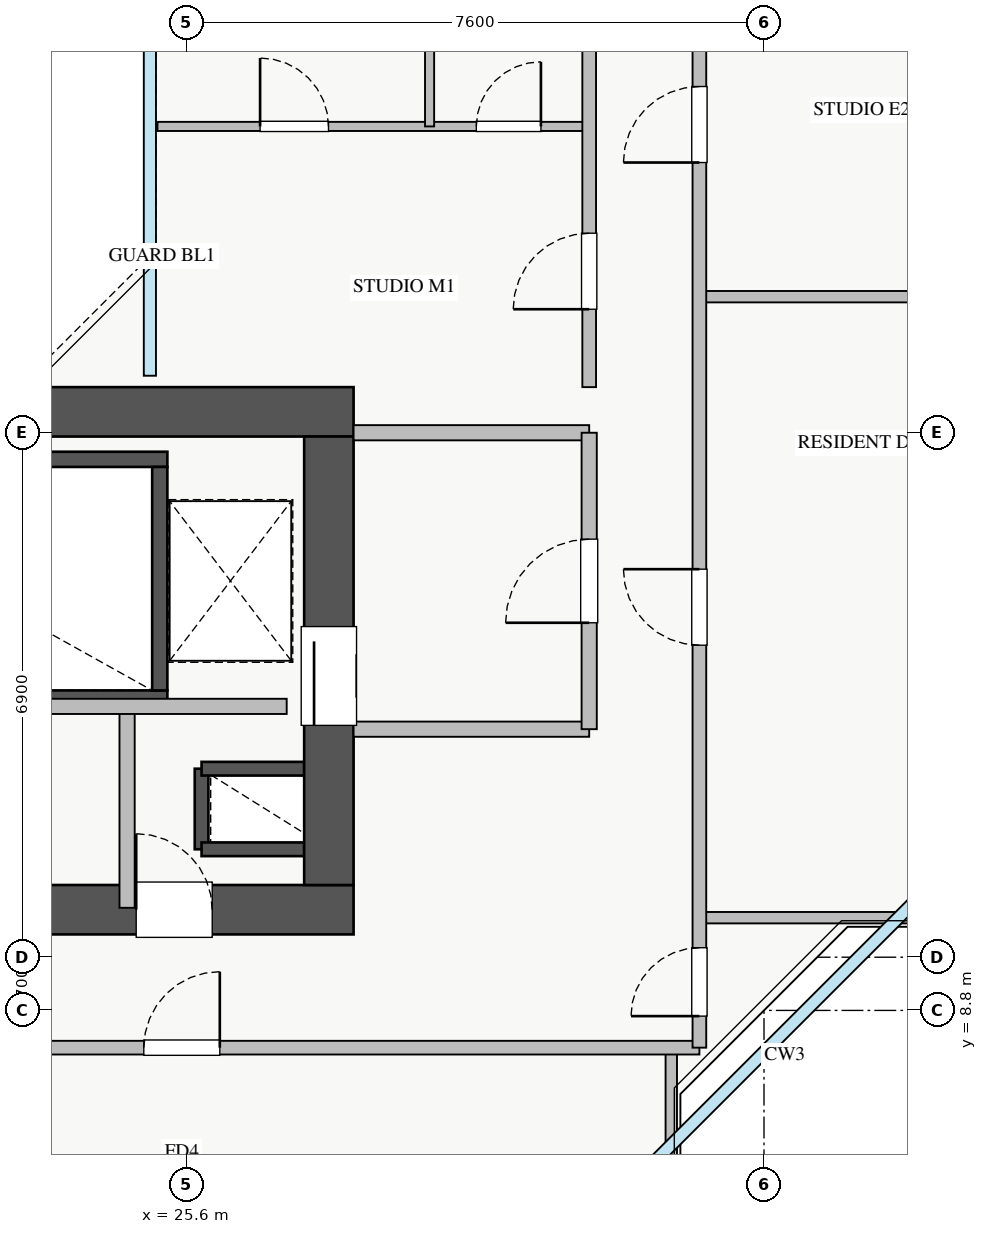
"""IFC4 building model, lengths in metres.
Left out: names, types, materials, properties, quantities, classifications, styles, units other than length and angle.
Written with IfcOpenShell. Run it as: python <this file> out.ifc"""

import sys

from ifc_helpers import new_model, si_unit, direction, frame, frame_2d, origin, place, context, subcontext, project, spatial, rectangle, extrude, source, transform, mapped, element, fill, save


model = new_model("IFC4")
c1 = context("Model", 3, precision=1e-05, world=origin(), true_north=direction((0.0, 1.0)))
c2 = subcontext(c1, "Body", "Model", "MODEL_VIEW")
j1 = project(units=[si_unit("LENGTHUNIT", "METRE"), si_unit("PLANEANGLEUNIT", "RADIAN")], contexts=[c1])
p1 = place(None, origin())
s1 = spatial("IfcSite", under=j1, at=p1, CompositionType="ELEMENT")
p2 = place(p1, origin())
s2 = spatial("IfcBuilding", under=s1, at=p2, CompositionType="ELEMENT")
p3 = place(p2, frame((0.0, 0.0, 126.25)))
s3 = spatial("IfcBuildingStorey", under=s2, at=p3, CompositionType="ELEMENT", Elevation=126.25)
p4 = place(p3, frame((25.8, 10.92, 0.0), z_axis=(0.0, 0.0, 1.0), x_axis=(0.0, 1.0, 0.0)))
e1 = element("IfcWall", 1, at=p4, inside=s3, PredefinedType="SHEAR", context=c2, shape_type="SweptSolid", body=[
    extrude(rectangle(XDim=1.06, YDim=0.18, at=frame_2d((0.53, 0.0))), origin(), (0.0, 0.0, 1.0), 3.07),
])
for number, where, z_axis, x_axis in (
    (2, (25.8, 11.98, 0.0), (0.0, 0.0, 1.0), (1.0, 0.0, 0.0)),
    (3, (25.8, 10.92, 0.0), (0.0, 0.0, 1.0), (1.0, 0.0, 0.0)),
):
    element("IfcWall", number, at=place(p3, frame(where, z_axis=z_axis, x_axis=x_axis)), inside=s3, PredefinedType="SHEAR", context=c2, shape_type="SweptSolid", body=[
        extrude(rectangle(XDim=1.35, YDim=0.18, at=frame_2d((0.675, 0.0))), origin(), (0.0, 0.0, 1.0), 3.07),
    ])
p5 = place(p3, frame((18.2, 12.91, 0.0), z_axis=(0.0, 0.0, 1.0), x_axis=(1.0, 0.0, 0.0)))
e4 = element("IfcWall", 4, at=p5, inside=s3, PredefinedType="SHEAR", context=c2, shape_type="SweptSolid", body=[
    extrude(rectangle(XDim=7.15, YDim=0.2, at=frame_2d((3.575, 0.0))), origin(), (0.0, 0.0, 1.0), 3.25),
])
p6 = place(p5, frame((0.35, 0.0, 0.0)))
e5 = element("IfcOpeningElement", 5, at=p6, cuts=e4, PredefinedType="OPENING", context=c2, shape_type="SweptSolid", body=[
    extrude(rectangle(XDim=1.1, YDim=2.05, at=frame_2d((0.55, 1.025))), frame((0.0, 0.11, 0.0), z_axis=(0.0, -1.0, 0.0), x_axis=(1.0, 0.0, 0.0)), (0.0, 0.0, 1.0), 0.22),
])
p7 = place(p3, frame((18.2, 16.05, 0.0), z_axis=(0.0, 0.0, 1.0), x_axis=(1.0, 0.0, 0.0)))
e6 = element("IfcWall", 6, at=p7, inside=s3, PredefinedType="SHEAR", context=c2, shape_type="SweptSolid", body=[
    extrude(rectangle(XDim=7.15, YDim=0.2, at=frame_2d((3.575, 0.0))), origin(), (0.0, 0.0, 1.0), 3.25),
])
p8 = place(p3, frame((25.25, 13.01, 0.0), z_axis=(0.0, 0.0, 1.0), x_axis=(0.0, 1.0, 0.0)))
e7 = element("IfcWall", 7, at=p8, inside=s3, PredefinedType="SHEAR", context=c2, shape_type="SweptSolid", body=[
    extrude(rectangle(XDim=2.94, YDim=0.2, at=frame_2d((1.47, 0.0))), origin(), (0.0, 0.0, 1.0), 3.25),
])
p9 = place(p3, frame((10.2, 10.125, 0.0), z_axis=(0.0, 0.0, 1.0), x_axis=(1.0, 0.0, 0.0)))
e8 = element("IfcWall", 8, at=p9, inside=s3, PredefinedType="SHEAR", context=c2, shape_type="SweptSolid", body=[
    extrude(rectangle(XDim=17.6, YDim=0.65, at=frame_2d((8.8, 0.0))), origin(), (0.0, 0.0, 1.0), 3.25),
])
p10 = place(p9, frame((1.15, 0.0, 0.0)))
e9 = element("IfcOpeningElement", 9, at=p10, cuts=e8, PredefinedType="OPENING", context=c2, shape_type="SweptSolid", body=[
    extrude(rectangle(XDim=1.1, YDim=2.05, at=frame_2d((0.55, 1.025))), frame((0.0, 0.335, 0.0), z_axis=(0.0, -1.0, 0.0), x_axis=(1.0, 0.0, 0.0)), (0.0, 0.0, 1.0), 0.67),
])
p11 = place(p9, frame((8.3, 0.0, 0.0)))
e10 = element("IfcOpeningElement", 10, at=p11, cuts=e8, PredefinedType="OPENING", context=c2, shape_type="SweptSolid", body=[
    extrude(rectangle(XDim=1.1, YDim=2.05, at=frame_2d((0.55, 1.025))), frame((0.0, 0.335, 0.0), z_axis=(0.0, -1.0, 0.0), x_axis=(1.0, 0.0, 0.0)), (0.0, 0.0, 1.0), 0.67),
])
p12 = place(p9, frame((4.9, 0.0, 0.0)))
e11 = element("IfcOpeningElement", 11, at=p12, cuts=e8, PredefinedType="OPENING", context=c2, shape_type="SweptSolid", body=[
    extrude(rectangle(XDim=1.1, YDim=2.05, at=frame_2d((0.55, 1.025))), frame((0.0, 0.335, 0.0), z_axis=(0.0, -1.0, 0.0), x_axis=(1.0, 0.0, 0.0)), (0.0, 0.0, 1.0), 0.67),
])
p13 = place(p9, frame((14.74, 0.0, 0.0)))
e12 = element("IfcOpeningElement", 12, at=p13, cuts=e8, PredefinedType="OPENING", context=c2, shape_type="SweptSolid", body=[
    extrude(rectangle(XDim=1.0, YDim=2.05, at=frame_2d((0.5, 1.025))), frame((0.0, 0.335, 0.0), z_axis=(0.0, -1.0, 0.0), x_axis=(1.0, 0.0, 0.0)), (0.0, 0.0, 1.0), 0.67),
])
p14 = place(p9, frame((11.67, 0.0, 0.0)))
e13 = element("IfcOpeningElement", 13, at=p14, cuts=e8, PredefinedType="OPENING", context=c2, shape_type="SweptSolid", body=[
    extrude(rectangle(XDim=1.0, YDim=2.05, at=frame_2d((0.5, 1.025))), frame((0.0, 0.335, 0.0), z_axis=(0.0, -1.0, 0.0), x_axis=(1.0, 0.0, 0.0)), (0.0, 0.0, 1.0), 0.67),
])
p15 = place(p3, frame((10.2, 16.675, 0.0), z_axis=(0.0, 0.0, 1.0), x_axis=(1.0, 0.0, 0.0)))
e14 = element("IfcWall", 14, at=p15, inside=s3, PredefinedType="SHEAR", context=c2, shape_type="SweptSolid", body=[
    extrude(rectangle(XDim=17.6, YDim=0.65, at=frame_2d((8.8, 0.0))), origin(), (0.0, 0.0, 1.0), 3.25),
])
p16 = place(p3, frame((27.475, 10.45, 0.0), z_axis=(0.0, 0.0, 1.0), x_axis=(0.0, 1.0, 0.0)))
e15 = element("IfcWall", 15, at=p16, inside=s3, PredefinedType="SHEAR", context=c2, shape_type="SweptSolid", body=[
    extrude(rectangle(XDim=5.9, YDim=0.65, at=frame_2d((2.95, 0.0))), origin(), (0.0, 0.0, 1.0), 3.25),
])
p17 = place(p16, frame((2.1, 0.0, 0.0)))
e16 = element("IfcOpeningElement", 16, at=p17, cuts=e15, PredefinedType="OPENING", context=c2, shape_type="SweptSolid", body=[
    extrude(rectangle(XDim=1.3, YDim=2.05, at=frame_2d((0.65, 1.025))), frame((0.0, 0.335, 0.0), z_axis=(0.0, -1.0, 0.0), x_axis=(1.0, 0.0, 0.0)), (0.0, 0.0, 1.0), 0.67),
])
for number, where, z_axis, x_axis in (
    (17, (27.8, 16.4, 0.0), (0.0, 0.0, 1.0), (1.0, 0.0, 0.0)),
    (18, (27.8, 12.5, 0.0), (0.0, 0.0, 1.0), (1.0, 0.0, 0.0)),
):
    element("IfcWall", number, at=place(p3, frame(where, z_axis=z_axis, x_axis=x_axis)), inside=s3, PredefinedType="PARTITIONING", context=c2, shape_type="SweptSolid", body=[
        extrude(rectangle(XDim=3.1, YDim=0.2, at=frame_2d((1.55, 0.0))), origin(), (0.0, 0.0, 1.0), 3.07),
    ])
p18 = place(p3, frame((30.9, 12.5, 0.0), z_axis=(0.0, 0.0, 1.0), x_axis=(0.0, 1.0, 0.0)))
e19 = element("IfcWall", 19, at=p18, inside=s3, PredefinedType="PARTITIONING", context=c2, shape_type="SweptSolid", body=[
    extrude(rectangle(XDim=3.9, YDim=0.2, at=frame_2d((1.95, 0.0))), origin(), (0.0, 0.0, 1.0), 3.07),
])
p19 = place(p18, frame((1.4, 0.0, 0.0)))
e20 = element("IfcOpeningElement", 20, at=p19, cuts=e19, PredefinedType="OPENING", context=c2, shape_type="SweptSolid", body=[
    extrude(rectangle(XDim=1.1, YDim=2.05, at=frame_2d((0.55, 1.025))), frame((0.0, 0.11, 0.0), z_axis=(0.0, -1.0, 0.0), x_axis=(1.0, 0.0, 0.0)), (0.0, 0.0, 1.0), 0.22),
])
p20 = place(p3, frame((24.82, 10.15, 0.0), z_axis=(0.0, 0.0, 1.0), x_axis=(0.0, 1.0, 0.0)))
e21 = element("IfcWall", 21, at=p20, inside=s3, PredefinedType="PARTITIONING", context=c2, shape_type="SweptSolid", body=[
    extrude(rectangle(XDim=2.65, YDim=0.2, at=frame_2d((1.325, 0.0))), origin(), (0.0, 0.0, 1.0), 3.07),
])
p21 = place(p3, frame((21.75, 12.8, 0.0), z_axis=(0.0, 0.0, 1.0), x_axis=(1.0, 0.0, 0.0)))
e22 = element("IfcWall", 22, at=p21, inside=s3, PredefinedType="PARTITIONING", context=c2, shape_type="SweptSolid", body=[
    extrude(rectangle(XDim=5.17, YDim=0.2, at=frame_2d((2.585, 0.0))), origin(), (0.0, 0.0, 1.0), 3.07),
])
p22 = place(p3, frame((31.98, 5.35, 0.0), z_axis=(0.0, 0.0, 1.0), x_axis=(0.0, 1.0, 0.0)))
e23 = element("IfcWall", 23, at=p22, inside=s3, PredefinedType="PARTITIONING", context=c2, shape_type="SweptSolid", body=[
    extrude(rectangle(XDim=2.96, YDim=0.15, at=frame_2d((1.48, 0.0))), origin(), (0.0, 0.0, 1.0), 3.07),
])
p23 = place(p3, frame((8.72, 8.31, 0.0), z_axis=(0.0, 0.0, 1.0), x_axis=(1.0, 0.0, 0.0)))
e24 = element("IfcWall", 24, at=p23, inside=s3, PredefinedType="PARTITIONING", context=c2, shape_type="SweptSolid", body=[
    extrude(rectangle(XDim=23.63, YDim=0.18, at=frame_2d((11.815, 0.0))), origin(), (0.0, 0.0, 1.0), 3.07),
])
p24 = place(p23, frame((4.69, 0.0, 0.0)))
e25 = element("IfcOpeningElement", 25, at=p24, cuts=e24, PredefinedType="OPENING", context=c2, shape_type="SweptSolid", body=[
    extrude(rectangle(XDim=1.0, YDim=2.05, at=frame_2d((0.5, 1.025))), frame((0.0, 0.1, 0.0), z_axis=(0.0, -1.0, 0.0), x_axis=(1.0, 0.0, 0.0)), (0.0, 0.0, 1.0), 0.2),
])
p25 = place(p23, frame((16.32, 0.0, 0.0)))
e26 = element("IfcOpeningElement", 26, at=p25, cuts=e24, PredefinedType="OPENING", context=c2, shape_type="SweptSolid", body=[
    extrude(rectangle(XDim=1.0, YDim=2.05, at=frame_2d((0.5, 1.025))), frame((0.0, 0.1, 0.0), z_axis=(0.0, -1.0, 0.0), x_axis=(1.0, 0.0, 0.0)), (0.0, 0.0, 1.0), 0.2),
])
p26 = place(p3, frame((32.35, 10.02, 0.0), z_axis=(0.0, 0.0, 1.0), x_axis=(1.0, 0.0, 0.0)))
e27 = element("IfcWall", 27, at=p26, inside=s3, PredefinedType="PARTITIONING", context=c2, shape_type="SweptSolid", body=[
    extrude(rectangle(XDim=4.3, YDim=0.15, at=frame_2d((2.15, 0.0))), origin(), (0.0, 0.0, 1.0), 3.07),
])
p27 = place(p3, frame((32.35, 18.19, 0.0), z_axis=(0.0, 0.0, 1.0), x_axis=(1.0, 0.0, 0.0)))
e28 = element("IfcWall", 28, at=p27, inside=s3, PredefinedType="PARTITIONING", context=c2, shape_type="SweptSolid", body=[
    extrude(rectangle(XDim=4.3, YDim=0.15, at=frame_2d((2.15, 0.0))), origin(), (0.0, 0.0, 1.0), 2.815),
])
p28 = place(p3, frame((32.35, 8.31, 0.0), z_axis=(0.0, 0.0, 1.0), x_axis=(0.0, 1.0, 0.0)))
e29 = element("IfcWall", 29, at=p28, inside=s3, PredefinedType="PARTITIONING", context=c2, shape_type="SweptSolid", body=[
    extrude(rectangle(XDim=29.37, YDim=0.18, at=frame_2d((14.685, 0.0))), origin(), (0.0, 0.0, 1.0), 3.07),
])
p29 = place(p28, frame((28.06, 0.0, 0.0)))
e30 = element("IfcOpeningElement", 30, at=p29, cuts=e29, PredefinedType="OPENING", context=c2, shape_type="SweptSolid", body=[
    extrude(rectangle(XDim=0.9, YDim=2.05, at=frame_2d((0.45, 1.025))), frame((0.0, 0.1, 0.0), z_axis=(0.0, -1.0, 0.0), x_axis=(1.0, 0.0, 0.0)), (0.0, 0.0, 1.0), 0.2),
])
p30 = place(p28, frame((0.415, 0.0, 0.0)))
e31 = element("IfcOpeningElement", 31, at=p30, cuts=e29, PredefinedType="OPENING", context=c2, shape_type="SweptSolid", body=[
    extrude(rectangle(XDim=0.9, YDim=2.05, at=frame_2d((0.45, 1.025))), frame((0.0, 0.1, 0.0), z_axis=(0.0, -1.0, 0.0), x_axis=(1.0, 0.0, 0.0)), (0.0, 0.0, 1.0), 0.2),
])
p31 = place(p28, frame((5.295, 0.0, 0.0)))
e32 = element("IfcOpeningElement", 32, at=p31, cuts=e29, PredefinedType="OPENING", context=c2, shape_type="SweptSolid", body=[
    extrude(rectangle(XDim=1.0, YDim=2.05, at=frame_2d((0.5, 1.025))), frame((0.0, 0.1, 0.0), z_axis=(0.0, -1.0, 0.0), x_axis=(1.0, 0.0, 0.0)), (0.0, 0.0, 1.0), 0.2),
])
p32 = place(p28, frame((11.645, 0.0, 0.0)))
e33 = element("IfcOpeningElement", 33, at=p32, cuts=e29, PredefinedType="OPENING", context=c2, shape_type="SweptSolid", body=[
    extrude(rectangle(XDim=1.0, YDim=2.05, at=frame_2d((0.5, 1.025))), frame((0.0, 0.1, 0.0), z_axis=(0.0, -1.0, 0.0), x_axis=(1.0, 0.0, 0.0)), (0.0, 0.0, 1.0), 0.2),
])
p33 = place(p28, frame((20.835, 0.0, 0.0)))
e34 = element("IfcOpeningElement", 34, at=p33, cuts=e29, PredefinedType="OPENING", context=c2, shape_type="SweptSolid", body=[
    extrude(rectangle(XDim=1.0, YDim=2.05, at=frame_2d((0.5, 1.025))), frame((0.0, 0.1, 0.0), z_axis=(0.0, -1.0, 0.0), x_axis=(1.0, 0.0, 0.0)), (0.0, 0.0, 1.0), 0.2),
])
p34 = place(p3, frame((25.22, 20.43, 0.0), z_axis=(0.0, 0.0, 1.0), x_axis=(1.0, 0.0, 0.0)))
e35 = element("IfcWall", 35, at=p34, inside=s3, PredefinedType="PLUMBINGWALL", context=c2, shape_type="SweptSolid", body=[
    extrude(rectangle(XDim=5.68, YDim=0.12, at=frame_2d((2.84, 0.0))), origin(), (0.0, 0.0, 1.0), 3.07),
])
p35 = place(p34, frame((1.35, 0.0, 0.0)))
e36 = element("IfcOpeningElement", 36, at=p35, cuts=e35, PredefinedType="OPENING", context=c2, shape_type="SweptSolid", body=[
    extrude(rectangle(XDim=0.9, YDim=2.05, at=frame_2d((0.45, 1.025))), frame((0.0, 0.07, 0.0), z_axis=(0.0, -1.0, 0.0), x_axis=(1.0, 0.0, 0.0)), (0.0, 0.0, 1.0), 0.14),
])
p36 = place(p34, frame((4.195, 0.0, 0.0)))
e37 = element("IfcOpeningElement", 37, at=p36, cuts=e35, PredefinedType="OPENING", context=c2, shape_type="SweptSolid", body=[
    extrude(rectangle(XDim=0.85, YDim=2.05, at=frame_2d((0.425, 1.025))), frame((0.0, 0.07, 0.0), z_axis=(0.0, -1.0, 0.0), x_axis=(1.0, 0.0, 0.0)), (0.0, 0.0, 1.0), 0.14),
])
p37 = place(p3, frame((28.8, 20.43, 0.0), z_axis=(0.0, 0.0, 1.0), x_axis=(0.0, 1.0, 0.0)))
e38 = element("IfcWall", 38, at=p37, inside=s3, PredefinedType="PLUMBINGWALL", context=c2, shape_type="SweptSolid", body=[
    extrude(rectangle(XDim=2.92, YDim=0.12, at=frame_2d((1.46, 0.0))), origin(), (0.0, 0.0, 1.0), 3.07),
])
p38 = place(p3, frame((30.9, 17.0, 0.0), z_axis=(0.0, 0.0, 1.0), x_axis=(0.0, 1.0, 0.0)))
e39 = element("IfcWall", 39, at=p38, inside=s3, PredefinedType="PARTITIONING", context=c2, shape_type="SweptSolid", body=[
    extrude(rectangle(XDim=12.0, YDim=0.18, at=frame_2d((6.0, 0.0))), origin(), (0.0, 0.0, 1.0), 3.07),
])
p39 = place(p38, frame((1.025, 0.0, 0.0)))
e40 = element("IfcOpeningElement", 40, at=p39, cuts=e39, PredefinedType="OPENING", context=c2, shape_type="SweptSolid", body=[
    extrude(rectangle(XDim=1.0, YDim=2.05, at=frame_2d((0.5, 1.025))), frame((0.0, 0.1, 0.0), z_axis=(0.0, -1.0, 0.0), x_axis=(1.0, 0.0, 0.0)), (0.0, 0.0, 1.0), 0.2),
])
p40 = place(p38, frame((7.185, 0.0, 0.0)))
e41 = element("IfcOpeningElement", 41, at=p40, cuts=e39, PredefinedType="OPENING", context=c2, shape_type="SweptSolid", body=[
    extrude(rectangle(XDim=1.0, YDim=2.05, at=frame_2d((0.5, 1.025))), frame((0.0, 0.1, 0.0), z_axis=(0.0, -1.0, 0.0), x_axis=(1.0, 0.0, 0.0)), (0.0, 0.0, 1.0), 0.2),
])
m1 = source(origin(), c2, "Body", "SweptSolid", [
    extrude(rectangle(XDim=1.3, YDim=2.05, at=frame_2d((0.65, 1.025))), frame((0.0, 0.025, 0.0), z_axis=(0.0, -1.0, 0.0), x_axis=(1.0, 0.0, 0.0)), (0.0, 0.0, 1.0), 0.05),
])
p41 = place(p17, origin())
e42 = element("IfcDoor", 42, at=p41, inside=s3, OperationType="SLIDING_TO_RIGHT", PredefinedType="DOOR", context=c2, shape_type="MappedRepresentation", body=[
    mapped(m1, transform((0.0, 0.0, 0.0), x_axis=(1.0, 0.0, 0.0), y_axis=(0.0, 1.0, 0.0), z_axis=(0.0, 0.0, 1.0), scale=1.0)),
])
fill(e16, e42)
m2 = source(origin(), c2, "Body", "SweptSolid", [
    extrude(rectangle(XDim=1.0, YDim=2.05, at=frame_2d((0.5, 1.025))), frame((0.0, 0.025, 0.0), z_axis=(0.0, -1.0, 0.0), x_axis=(1.0, 0.0, 0.0)), (0.0, 0.0, 1.0), 0.05),
])
p42 = place(p13, origin())
e43 = element("IfcDoor", 43, at=p42, inside=s3, OperationType="SINGLE_SWING_LEFT", PredefinedType="DOOR", context=c2, shape_type="MappedRepresentation", body=[
    mapped(m2, transform((0.0, 0.0, 0.0), x_axis=(1.0, 0.0, 0.0), y_axis=(0.0, 1.0, 0.0), z_axis=(0.0, 0.0, 1.0), scale=1.0)),
])
fill(e12, e43)
m3 = source(origin(), c2, "Body", "SweptSolid", [
    extrude(rectangle(XDim=1.1, YDim=2.05, at=frame_2d((0.55, 1.025))), frame((0.0, 0.025, 0.0), z_axis=(0.0, -1.0, 0.0), x_axis=(1.0, 0.0, 0.0)), (0.0, 0.0, 1.0), 0.05),
])
p43 = place(p19, origin())
e44 = element("IfcDoor", 44, at=p43, inside=s3, OperationType="SINGLE_SWING_LEFT", PredefinedType="DOOR", context=c2, shape_type="MappedRepresentation", body=[
    mapped(m3, transform((0.0, 0.0, 0.0), x_axis=(1.0, 0.0, 0.0), y_axis=(0.0, 1.0, 0.0), z_axis=(0.0, 0.0, 1.0), scale=1.0)),
])
fill(e20, e44)
p44 = place(p25, origin())
e45 = element("IfcDoor", 45, at=p44, inside=s3, OperationType="SINGLE_SWING_RIGHT", PredefinedType="DOOR", context=c2, shape_type="MappedRepresentation", body=[
    mapped(m2, transform((0.0, 0.0, 0.0), x_axis=(1.0, 0.0, 0.0), y_axis=(0.0, 1.0, 0.0), z_axis=(0.0, 0.0, 1.0), scale=1.0)),
])
fill(e26, e45)
m4 = source(origin(), c2, "Body", "SweptSolid", [
    extrude(rectangle(XDim=0.9, YDim=2.05, at=frame_2d((0.45, 1.025))), frame((0.0, 0.025, 0.0), z_axis=(0.0, -1.0, 0.0), x_axis=(1.0, 0.0, 0.0)), (0.0, 0.0, 1.0), 0.05),
])
p45 = place(p30, origin())
e46 = element("IfcDoor", 46, at=p45, inside=s3, OperationType="SINGLE_SWING_LEFT", PredefinedType="DOOR", context=c2, shape_type="MappedRepresentation", body=[
    mapped(m4, transform((0.0, 0.0, 0.0), x_axis=(1.0, 0.0, 0.0), y_axis=(0.0, 1.0, 0.0), z_axis=(0.0, 0.0, 1.0), scale=1.0)),
])
fill(e31, e46)
p46 = place(p31, origin())
e47 = element("IfcDoor", 47, at=p46, inside=s3, OperationType="SINGLE_SWING_RIGHT", PredefinedType="DOOR", context=c2, shape_type="MappedRepresentation", body=[
    mapped(m2, transform((0.0, 0.0, 0.0), x_axis=(1.0, 0.0, 0.0), y_axis=(0.0, 1.0, 0.0), z_axis=(0.0, 0.0, 1.0), scale=1.0)),
])
fill(e32, e47)
p47 = place(p32, origin())
e48 = element("IfcDoor", 48, at=p47, inside=s3, OperationType="SINGLE_SWING_LEFT", PredefinedType="DOOR", context=c2, shape_type="MappedRepresentation", body=[
    mapped(m2, transform((0.0, 0.0, 0.0), x_axis=(1.0, 0.0, 0.0), y_axis=(0.0, 1.0, 0.0), z_axis=(0.0, 0.0, 1.0), scale=1.0)),
])
fill(e33, e48)
p48 = place(p35, origin())
e49 = element("IfcDoor", 49, at=p48, inside=s3, OperationType="SINGLE_SWING_LEFT", PredefinedType="DOOR", context=c2, shape_type="MappedRepresentation", body=[
    mapped(m4, transform((0.0, 0.0, 0.0), x_axis=(1.0, 0.0, 0.0), y_axis=(0.0, 1.0, 0.0), z_axis=(0.0, 0.0, 1.0), scale=1.0)),
])
fill(e36, e49)
m5 = source(origin(), c2, "Body", "SweptSolid", [
    extrude(rectangle(XDim=0.85, YDim=2.05, at=frame_2d((0.425, 1.025))), frame((0.0, 0.025, 0.0), z_axis=(0.0, -1.0, 0.0), x_axis=(1.0, 0.0, 0.0)), (0.0, 0.0, 1.0), 0.05),
])
p49 = place(p36, origin())
e50 = element("IfcDoor", 50, at=p49, inside=s3, OperationType="SINGLE_SWING_RIGHT", PredefinedType="DOOR", context=c2, shape_type="MappedRepresentation", body=[
    mapped(m5, transform((0.0, 0.0, 0.0), x_axis=(1.0, 0.0, 0.0), y_axis=(0.0, 1.0, 0.0), z_axis=(0.0, 0.0, 1.0), scale=1.0)),
])
fill(e37, e50)
p50 = place(p39, origin())
e51 = element("IfcDoor", 51, at=p50, inside=s3, OperationType="SINGLE_SWING_LEFT", PredefinedType="DOOR", context=c2, shape_type="MappedRepresentation", body=[
    mapped(m2, transform((0.0, 0.0, 0.0), x_axis=(1.0, 0.0, 0.0), y_axis=(0.0, 1.0, 0.0), z_axis=(0.0, 0.0, 1.0), scale=1.0)),
])
fill(e40, e51)
save(model, sys.argv[1])
